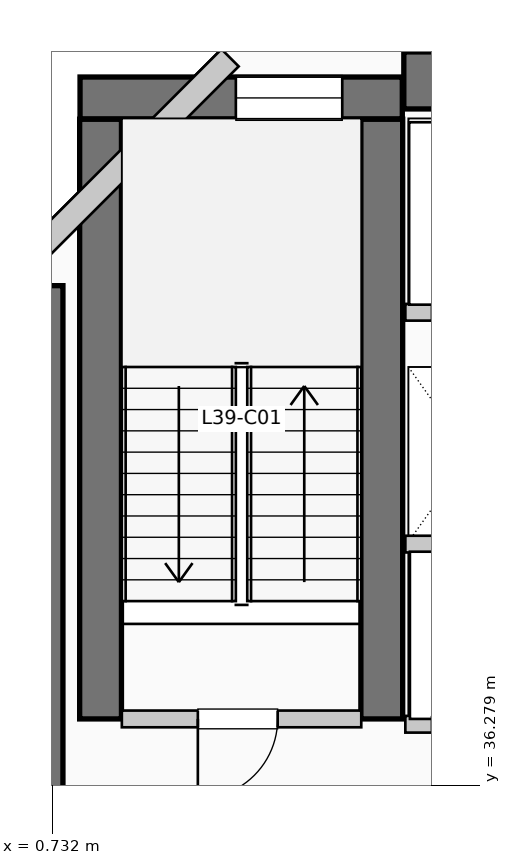
"""IFC4 building model, lengths in metres.
Left out: names, types, materials, properties, quantities, classifications, styles, units other than length and angle.
Written with IfcOpenShell. Run it as: python <this file> out.ifc"""

import sys

from ifc_helpers import new_model, si_unit, direction, frame, frame_2d, origin, place, context, subcontext, project, spatial, rectangle, extrude, element, fill, save


model = new_model("IFC4")
c1 = context("Model", 3, precision=1e-05, world=origin(), true_north=direction((0.0, 1.0)))
c2 = subcontext(c1, "Body", "Model", "MODEL_VIEW")
j1 = project(units=[si_unit("LENGTHUNIT", "METRE"), si_unit("PLANEANGLEUNIT", "RADIAN")], contexts=[c1])
p1 = place(None, origin())
s1 = spatial("IfcSite", under=j1, at=p1, CompositionType="ELEMENT")
p2 = place(p1, origin())
s2 = spatial("IfcBuilding", under=s1, at=p2, CompositionType="ELEMENT")
p3 = place(p2, frame((0.0, 0.0, 162.69)))
s3 = spatial("IfcBuildingStorey", under=s2, at=p3, CompositionType="ELEMENT", Elevation=162.69)
p4 = place(p3, frame((5.36, 45.55, 0.0), z_axis=(0.0, 0.0, 1.0), x_axis=(1.0, 0.0, 0.0)))
e1 = element("IfcWall", 1, at=p4, inside=s3, PredefinedType="SHEAR", context=c2, shape_type="SweptSolid", body=[
    extrude(rectangle(XDim=13.98, YDim=0.75, at=frame_2d((6.99, 0.0))), origin(), (0.0, 0.0, 1.0), 3.96),
])
p5 = place(p3, frame((0.5, 34.95, 0.0), z_axis=(0.0, 0.0, 1.0), x_axis=(0.0, 1.0, 0.0)))
e2 = element("IfcWall", 2, at=p5, inside=s3, PredefinedType="SHEAR", context=c2, shape_type="SweptSolid", body=[
    extrude(rectangle(XDim=7.9, YDim=0.75, at=frame_2d((3.95, 0.0))), origin(), (0.0, 0.0, 1.0), 3.96),
])
for number, where, z_axis, x_axis in (
    (3, (1.37, 37.15, 0.0), (0.0, 0.0, 1.0), (0.0, 1.0, 0.0)),
    (4, (5.07, 37.15, 0.0), (0.0, 0.0, 1.0), (0.0, 1.0, 0.0)),
):
    element("IfcWall", number, at=place(p3, frame(where, z_axis=z_axis, x_axis=x_axis)), inside=s3, PredefinedType="SHEAR", context=c2, shape_type="SweptSolid", body=[
        extrude(rectangle(XDim=7.89, YDim=0.55, at=frame_2d((3.945, 0.0))), origin(), (0.0, 0.0, 1.0), 3.96),
    ])
p6 = place(p3, frame((1.1, 45.32, 0.0), z_axis=(0.0, 0.0, 1.0), x_axis=(1.0, 0.0, 0.0)))
e5 = element("IfcWall", 5, at=p6, inside=s3, PredefinedType="SHEAR", context=c2, shape_type="SweptSolid", body=[
    extrude(rectangle(XDim=4.24, YDim=0.55, at=frame_2d((2.12, 0.0))), origin(), (0.0, 0.0, 1.0), 3.96),
])
p7 = place(p6, frame((2.05, 0.0, 1.05)))
e6 = element("IfcOpeningElement", 6, at=p7, cuts=e5, PredefinedType="OPENING", context=c2, shape_type="SweptSolid", body=[
    extrude(rectangle(XDim=1.4, YDim=1.8, at=frame_2d((0.7, 0.9))), frame((0.0, 0.285, 0.0), z_axis=(0.0, -1.0, 0.0), x_axis=(1.0, 0.0, 0.0)), (0.0, 0.0, 1.0), 0.57),
])
p8 = place(p3, frame((3.074, 45.848, 0.0), z_axis=(0.0, 0.0, 1.0), x_axis=(-0.707106781187, -0.707106781187, 0.0)))
e7 = element("IfcWall", 7, at=p8, inside=s3, PredefinedType="SOLIDWALL", context=c2, shape_type="SweptSolid", body=[
    extrude(rectangle(XDim=4.133, YDim=0.32, at=frame_2d((2.066, 0.0))), origin(), (0.0, 0.0, 1.0), 3.71),
])
p9 = place(p3, frame((1.65, 37.15, 0.0), z_axis=(0.0, 0.0, 1.0), x_axis=(1.0, 0.0, 0.0)))
e8 = element("IfcWall", 8, at=p9, inside=s3, PredefinedType="PARTITIONING", context=c2, shape_type="SweptSolid", body=[
    extrude(rectangle(XDim=3.15, YDim=0.22, at=frame_2d((1.575, 0.0))), origin(), (0.0, 0.0, 1.0), 3.71),
])
p10 = place(p9, frame((2.05, 0.0, 0.0), z_axis=(0.0, 0.0, 1.0), x_axis=(-1.0, 0.0, 0.0)))
e9 = element("IfcOpeningElement", 9, at=p10, cuts=e8, PredefinedType="OPENING", context=c2, shape_type="SweptSolid", body=[
    extrude(rectangle(XDim=1.05, YDim=2.15, at=frame_2d((0.525, 1.075))), frame((0.0, 0.12, 0.0), z_axis=(0.0, -1.0, 0.0), x_axis=(1.0, 0.0, 0.0)), (0.0, 0.0, 1.0), 0.24),
])
p11 = place(p3, frame((5.38, 37.08, 0.0), z_axis=(0.0, 0.0, 1.0), x_axis=(1.0, 0.0, 0.0)))
e10 = element("IfcWall", 10, at=p11, inside=s3, PredefinedType="PARTITIONING", context=c2, shape_type="SweptSolid", body=[
    extrude(rectangle(XDim=3.46, YDim=0.22, at=frame_2d((1.73, 0.0))), origin(), (0.0, 0.0, 1.0), 3.71),
])
p12 = place(p11, frame((1.55, 0.0, 0.0), z_axis=(0.0, 0.0, 1.0), x_axis=(-1.0, 0.0, 0.0)))
e11 = element("IfcOpeningElement", 11, at=p12, cuts=e10, PredefinedType="OPENING", context=c2, shape_type="SweptSolid", body=[
    extrude(rectangle(XDim=1.2, YDim=2.2, at=frame_2d((0.6, 1.1))), frame((0.0, 0.12, 0.0), z_axis=(0.0, -1.0, 0.0), x_axis=(1.0, 0.0, 0.0)), (0.0, 0.0, 1.0), 0.24),
])
p13 = place(p11, frame((3.22, 0.0, 0.0), z_axis=(0.0, 0.0, 1.0), x_axis=(-1.0, 0.0, 0.0)))
e12 = element("IfcOpeningElement", 12, at=p13, cuts=e10, PredefinedType="OPENING", context=c2, shape_type="SweptSolid", body=[
    extrude(rectangle(XDim=1.2, YDim=2.2, at=frame_2d((0.6, 1.1))), frame((0.0, 0.12, 0.0), z_axis=(0.0, -1.0, 0.0), x_axis=(1.0, 0.0, 0.0)), (0.0, 0.0, 1.0), 0.24),
])
p14 = place(p3, frame((5.38, 39.45, 0.0), z_axis=(0.0, 0.0, 1.0), x_axis=(1.0, 0.0, 0.0)))
e13 = element("IfcWall", 13, at=p14, inside=s3, PredefinedType="PARTITIONING", context=c2, shape_type="SweptSolid", body=[
    extrude(rectangle(XDim=3.46, YDim=0.22, at=frame_2d((1.73, 0.0))), origin(), (0.0, 0.0, 1.0), 3.71),
])
p15 = place(p3, frame((5.38, 42.5, 0.0), z_axis=(0.0, 0.0, 1.0), x_axis=(1.0, 0.0, 0.0)))
e14 = element("IfcWall", 14, at=p15, inside=s3, PredefinedType="PARTITIONING", context=c2, shape_type="SweptSolid", body=[
    extrude(rectangle(XDim=3.77, YDim=0.22, at=frame_2d((1.885, 0.0))), origin(), (0.0, 0.0, 1.0), 3.71),
])
p16 = place(p15, frame((1.75, 0.0, 0.0), z_axis=(0.0, 0.0, 1.0), x_axis=(-1.0, 0.0, 0.0)))
e15 = element("IfcOpeningElement", 15, at=p16, cuts=e14, PredefinedType="OPENING", context=c2, shape_type="SweptSolid", body=[
    extrude(rectangle(XDim=1.4, YDim=2.2, at=frame_2d((0.7, 1.1))), frame((0.0, 0.12, 0.0), z_axis=(0.0, -1.0, 0.0), x_axis=(1.0, 0.0, 0.0)), (0.0, 0.0, 1.0), 0.24),
])
p17 = place(p15, frame((3.53, 0.0, 0.0), z_axis=(0.0, 0.0, 1.0), x_axis=(-1.0, 0.0, 0.0)))
e16 = element("IfcOpeningElement", 16, at=p17, cuts=e14, PredefinedType="OPENING", context=c2, shape_type="SweptSolid", body=[
    extrude(rectangle(XDim=1.4, YDim=2.2, at=frame_2d((0.7, 1.1))), frame((0.0, 0.12, 0.0), z_axis=(0.0, -1.0, 0.0), x_axis=(1.0, 0.0, 0.0)), (0.0, 0.0, 1.0), 0.24),
])
p18 = place(p7, origin())
e17 = element("IfcWindow", 17, at=p18, inside=s3, PartitioningType="SINGLE_PANEL", PredefinedType="WINDOW", context=c2, shape_type="SweptSolid", body=[
    extrude(rectangle(XDim=1.4, YDim=1.8, at=frame_2d((0.7, 0.9))), frame((0.0, 0.03, 0.0), z_axis=(0.0, -1.0, 0.0), x_axis=(1.0, 0.0, 0.0)), (0.0, 0.0, 1.0), 0.06),
])
fill(e6, e17)
p19 = place(p10, origin())
e18 = element("IfcDoor", 18, at=p19, inside=s3, OperationType="SINGLE_SWING_LEFT", PredefinedType="DOOR", context=c2, shape_type="SweptSolid", body=[
    extrude(rectangle(XDim=1.05, YDim=2.15, at=frame_2d((0.525, 1.075))), frame((0.0, 0.025, 0.0), z_axis=(0.0, -1.0, 0.0), x_axis=(1.0, 0.0, 0.0)), (0.0, 0.0, 1.0), 0.05),
])
fill(e9, e18)
save(model, sys.argv[1])
